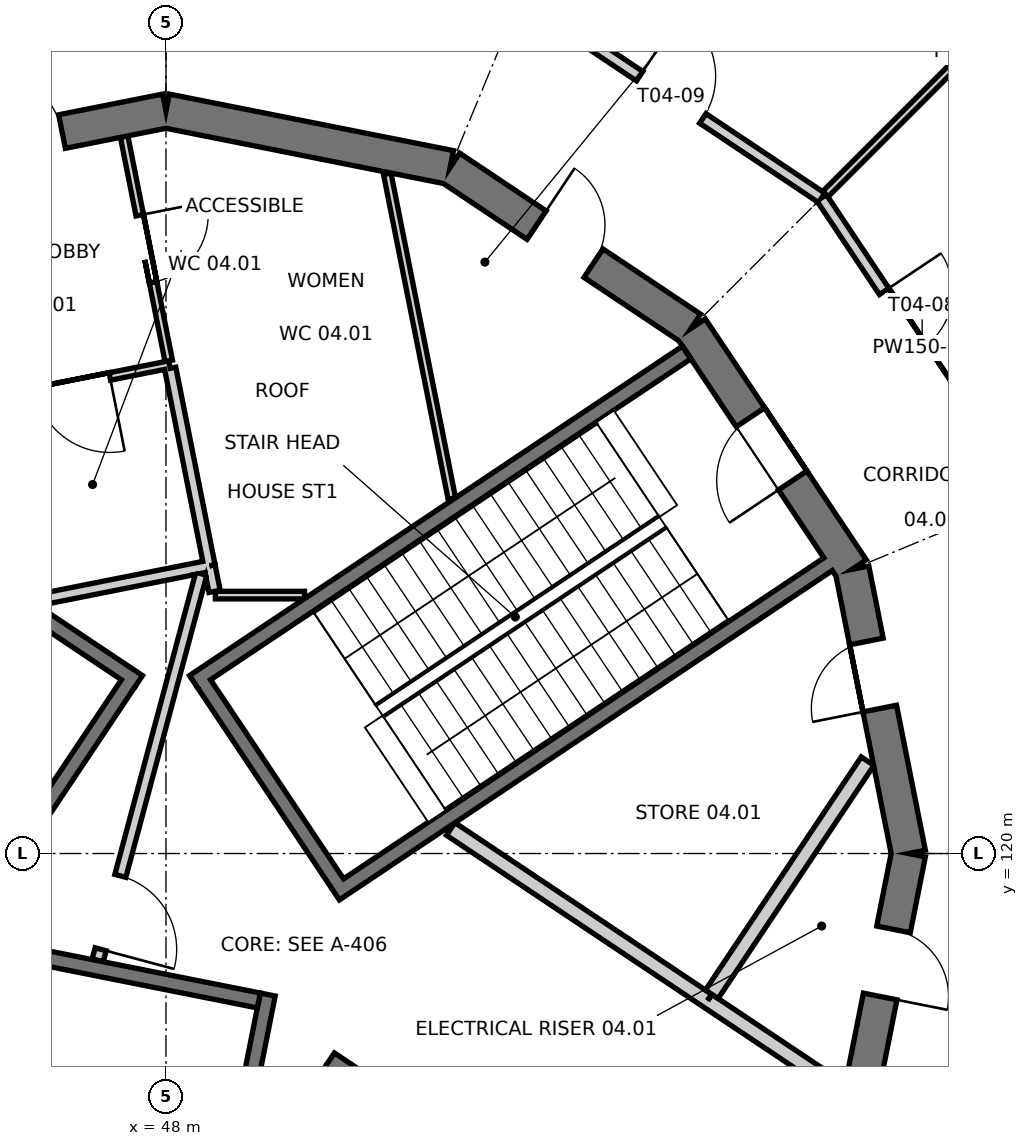
"""IFC4 building model, lengths in metres.
Left out: names, types, materials, properties, quantities, classifications, styles, units other than length and angle.
Written with IfcOpenShell. Run it as: python <this file> out.ifc"""

import sys

from ifc_helpers import new_model, si_unit, direction, frame, frame_2d, origin, place, context, subcontext, project, spatial, polyline, rectangle, outline, extrude, element, fill, save


model = new_model("IFC4")
c1 = context("Model", 3, precision=1e-05, world=origin(), true_north=direction((0.0, 1.0)))
c2 = subcontext(c1, "Body", "Model", "MODEL_VIEW")
j1 = project(units=[si_unit("LENGTHUNIT", "METRE"), si_unit("PLANEANGLEUNIT", "RADIAN")], contexts=[c1])
p1 = place(None, origin())
s1 = spatial("IfcSite", under=j1, at=p1, CompositionType="ELEMENT")
p2 = place(p1, origin())
s2 = spatial("IfcBuilding", under=s1, at=p2, CompositionType="ELEMENT")
p3 = place(p2, frame((0.0, 0.0, 20.4)))
s3 = spatial("IfcBuildingStorey", under=s2, at=p3, CompositionType="ELEMENT", Elevation=20.4)
p4 = place(p3, frame((57.771, 120.0, 0.0), z_axis=(0.0, 0.0, 1.0), x_axis=(-0.195069197673, 0.98078948206, 0.0)))
e1 = element("IfcWall", 1, at=p4, inside=s3, PredefinedType="SHEAR", context=c2, shape_type="SweptSolid", body=[
    extrude(outline(polyline([(-0.045, -0.225), (3.857, -0.225), (3.768, 0.225), (0.045, 0.225), (-0.045, -0.225)])), origin(), (0.0, 0.0, 1.0), 4.52),
])
p5 = place(p4, frame((1.945, 0.0, 0.0)))
e2 = element("IfcOpeningElement", 2, at=p5, cuts=e1, PredefinedType="OPENING", context=c2, shape_type="SweptSolid", body=[
    extrude(rectangle(XDim=0.9, YDim=2.1, at=frame_2d((0.45, 1.05))), frame((0.0, 0.235, 0.0), z_axis=(0.0, -1.0, 0.0), x_axis=(1.0, 0.0, 0.0)), (0.0, 0.0, 1.0), 0.47),
])
p6 = place(p3, frame((57.027, 123.739, 0.0), z_axis=(0.0, 0.0, 1.0), x_axis=(-0.555542277102, 0.83148829117, 0.0)))
e3 = element("IfcWall", 3, at=p6, inside=s3, PredefinedType="SHEAR", context=c2, shape_type="SweptSolid", body=[
    extrude(outline(polyline([(-0.045, -0.225), (3.857, -0.225), (3.768, 0.225), (0.045, 0.225), (-0.045, -0.225)])), origin(), (0.0, 0.0, 1.0), 4.52),
])
p7 = place(p6, frame((1.406, 0.0, 0.0)))
e4 = element("IfcOpeningElement", 4, at=p7, cuts=e3, PredefinedType="OPENING", context=c2, shape_type="SweptSolid", body=[
    extrude(rectangle(XDim=1.0, YDim=2.1, at=frame_2d((0.5, 1.05))), frame((0.0, 0.235, 0.0), z_axis=(0.0, -1.0, 0.0), x_axis=(1.0, 0.0, 0.0)), (0.0, 0.0, 1.0), 0.47),
])
p8 = place(p3, frame((54.909, 126.909, 0.0), z_axis=(0.0, 0.0, 1.0), x_axis=(-0.83148829117, 0.555542277102, 0.0)))
e5 = element("IfcWall", 5, at=p8, inside=s3, PredefinedType="SHEAR", context=c2, shape_type="SweptSolid", body=[
    extrude(outline(polyline([(-0.045, -0.225), (3.857, -0.225), (3.768, 0.225), (0.045, 0.225), (-0.045, -0.225)])), origin(), (0.0, 0.0, 1.0), 4.52),
])
p9 = place(p8, frame((1.545, 0.0, 0.0)))
e6 = element("IfcOpeningElement", 6, at=p9, cuts=e5, PredefinedType="OPENING", context=c2, shape_type="SweptSolid", body=[
    extrude(rectangle(XDim=0.9, YDim=2.1, at=frame_2d((0.45, 1.05))), frame((0.0, 0.235, 0.0), z_axis=(0.0, -1.0, 0.0), x_axis=(1.0, 0.0, 0.0)), (0.0, 0.0, 1.0), 0.47),
])
p10 = place(p3, frame((51.739, 129.027, 0.0), z_axis=(0.0, 0.0, 1.0), x_axis=(-0.98078948206, 0.195069197673, 0.0)))
e7 = element("IfcWall", 7, at=p10, inside=s3, PredefinedType="SHEAR", context=c2, shape_type="SweptSolid", body=[
    extrude(outline(polyline([(-0.045, -0.225), (3.857, -0.225), (3.768, 0.225), (0.045, 0.225), (-0.045, -0.225)])), origin(), (0.0, 0.0, 1.0), 4.52),
])
p11 = place(p3, frame((48.0, 129.771, 0.0), z_axis=(0.0, 0.0, 1.0), x_axis=(-0.98078948206, -0.195069197673, 0.0)))
e8 = element("IfcWall", 8, at=p11, inside=s3, PredefinedType="SHEAR", context=c2, shape_type="SweptSolid", body=[
    extrude(outline(polyline([(-0.045, -0.225), (3.857, -0.225), (3.768, 0.225), (0.045, 0.225), (-0.045, -0.225)])), origin(), (0.0, 0.0, 1.0), 4.52),
])
p12 = place(p11, frame((1.395, 0.0, 0.0)))
e9 = element("IfcOpeningElement", 9, at=p12, cuts=e8, PredefinedType="OPENING", context=c2, shape_type="SweptSolid", body=[
    extrude(rectangle(XDim=1.0, YDim=2.1, at=frame_2d((0.5, 1.05))), frame((0.0, 0.235, 0.0), z_axis=(0.0, -1.0, 0.0), x_axis=(1.0, 0.0, 0.0)), (0.0, 0.0, 1.0), 0.47),
])
p13 = place(p3, frame((57.027, 116.261, 0.0), z_axis=(0.0, 0.0, 1.0), x_axis=(0.195069197673, 0.98078948206, 0.0)))
e10 = element("IfcWall", 10, at=p13, inside=s3, PredefinedType="SHEAR", context=c2, shape_type="SweptSolid", body=[
    extrude(outline(polyline([(-0.045, -0.225), (3.857, -0.225), (3.768, 0.225), (0.045, 0.225), (-0.045, -0.225)])), origin(), (0.0, 0.0, 1.0), 4.52),
])
p14 = place(p13, frame((1.895, 0.0, 0.0)))
e11 = element("IfcOpeningElement", 11, at=p14, cuts=e10, PredefinedType="OPENING", context=c2, shape_type="SweptSolid", body=[
    extrude(rectangle(XDim=0.9, YDim=2.1, at=frame_2d((0.45, 1.05))), frame((0.0, 0.235, 0.0), z_axis=(0.0, -1.0, 0.0), x_axis=(1.0, 0.0, 0.0)), (0.0, 0.0, 1.0), 0.47),
])
p15 = place(p3, frame((48.365, 122.258, 0.0), z_axis=(0.0, 0.0, 1.0), x_axis=(0.831476803301, 0.555559470779, 0.0)))
e12 = element("IfcWall", 12, at=p15, inside=s3, PredefinedType="SHEAR", context=c2, shape_type="SweptSolid", body=[
    extrude(rectangle(XDim=7.8, YDim=0.2, at=frame_2d((3.9, 0.0))), origin(), (0.0, 0.0, 1.0), 4.52),
])
p16 = place(p3, frame((50.226, 119.473, 0.0), z_axis=(0.0, 0.0, 1.0), x_axis=(0.831486463828, 0.555545012102, 0.0)))
e13 = element("IfcWall", 13, at=p16, inside=s3, PredefinedType="SHEAR", context=c2, shape_type="SweptSolid", body=[
    extrude(rectangle(XDim=7.8, YDim=0.2, at=frame_2d((3.9, 0.0))), origin(), (0.0, 0.0, 1.0), 4.52),
])
p17 = place(p3, frame((50.253, 119.612, 0.0), z_axis=(0.0, 0.0, 1.0), x_axis=(-0.55555842186, 0.831477504146, 0.0)))
e14 = element("IfcWall", 14, at=p17, inside=s3, PredefinedType="SHEAR", context=c2, shape_type="SweptSolid", body=[
    extrude(rectangle(XDim=3.15, YDim=0.2, at=frame_2d((1.575, 0.0))), origin(), (0.0, 0.0, 1.0), 4.52),
])
p18 = place(p3, frame((47.635, 122.258, 0.0), z_axis=(0.0, 0.0, 1.0), x_axis=(-0.831476803301, 0.555559470779, 0.0)))
e15 = element("IfcWall", 15, at=p18, inside=s3, PredefinedType="SHEAR", context=c2, shape_type="SweptSolid", body=[
    extrude(rectangle(XDim=7.8, YDim=0.2, at=frame_2d((3.9, 0.0))), origin(), (0.0, 0.0, 1.0), 4.52),
])
p19 = place(p3, frame((47.497, 122.231, 0.0), z_axis=(0.0, 0.0, 1.0), x_axis=(-0.55555842186, -0.831477504146, 0.0)))
e16 = element("IfcWall", 16, at=p19, inside=s3, PredefinedType="SHEAR", context=c2, shape_type="SweptSolid", body=[
    extrude(rectangle(XDim=3.15, YDim=0.2, at=frame_2d((1.575, 0.0))), origin(), (0.0, 0.0, 1.0), 4.52),
])
p20 = place(p3, frame((49.339, 118.145, 0.0), z_axis=(0.0, 0.0, 1.0), x_axis=(-0.195092759861, -0.980784795483, 0.0)))
e17 = element("IfcWall", 17, at=p20, inside=s3, PredefinedType="SHEAR", context=c2, shape_type="SweptSolid", body=[
    extrude(rectangle(XDim=7.8, YDim=0.2, at=frame_2d((3.9, 0.0))), origin(), (0.0, 0.0, 1.0), 4.52),
])
p21 = place(p3, frame((46.132, 118.681, 0.0), z_axis=(0.0, 0.0, 1.0), x_axis=(0.980785830564, -0.195087556151, 0.0)))
e18 = element("IfcWall", 18, at=p21, inside=s3, PredefinedType="SHEAR", context=c2, shape_type="SweptSolid", body=[
    extrude(rectangle(XDim=3.15, YDim=0.2, at=frame_2d((1.575, 0.0))), origin(), (0.0, 0.0, 1.0), 4.52),
])
p22 = place(p3, frame((50.16, 117.293, 0.0), z_axis=(0.0, 0.0, 1.0), x_axis=(0.831479497601, -0.55555543834, 0.0)))
e19 = element("IfcWall", 19, at=p22, inside=s3, PredefinedType="SHEAR", context=c2, shape_type="SweptSolid", body=[
    extrude(rectangle(XDim=5.4, YDim=0.2, at=frame_2d((2.7, 0.0))), origin(), (0.0, 0.0, 1.0), 9.02),
])
p23 = place(p22, frame((0.85, 0.0, 0.0)))
e20 = element("IfcOpeningElement", 20, at=p23, cuts=e19, PredefinedType="OPENING", context=c2, shape_type="SweptSolid", body=[
    extrude(rectangle(XDim=1.1, YDim=2.1, at=frame_2d((0.55, 1.05))), frame((0.0, 0.11, 0.0), z_axis=(0.0, -1.0, 0.0), x_axis=(1.0, 0.0, 0.0)), (0.0, 0.0, 1.0), 0.22),
])
p24 = place(p22, frame((3.45, 0.0, 0.0)))
e21 = element("IfcOpeningElement", 21, at=p24, cuts=e19, PredefinedType="OPENING", context=c2, shape_type="SweptSolid", body=[
    extrude(rectangle(XDim=1.1, YDim=2.1, at=frame_2d((0.55, 1.05))), frame((0.0, 0.11, 0.0), z_axis=(0.0, -1.0, 0.0), x_axis=(1.0, 0.0, 0.0)), (0.0, 0.0, 1.0), 0.22),
])
p25 = place(p3, frame((50.188, 117.155, 0.0), z_axis=(0.0, 0.0, 1.0), x_axis=(-0.555559945722, -0.831476485963, 0.0)))
e22 = element("IfcWall", 22, at=p25, inside=s3, PredefinedType="SHEAR", context=c2, shape_type="SweptSolid", body=[
    extrude(rectangle(XDim=1.9, YDim=0.2, at=frame_2d((0.95, 0.0))), origin(), (0.0, 0.0, 1.0), 9.02),
])
p26 = place(p3, frame((48.365, 122.258, 4.8), z_axis=(0.0, 0.0, 1.0), x_axis=(0.831476803301, 0.555559470779, 0.0)))
e23 = element("IfcWall", 23, at=p26, inside=s3, PredefinedType="SOLIDWALL", context=c2, shape_type="SweptSolid", body=[
    extrude(rectangle(XDim=7.8, YDim=0.2, at=frame_2d((3.9, 0.0))), origin(), (0.0, 0.0, 1.0), 2.4),
])
p27 = place(p3, frame((50.226, 119.473, 4.8), z_axis=(0.0, 0.0, 1.0), x_axis=(0.831486463828, 0.555545012102, 0.0)))
e24 = element("IfcWall", 24, at=p27, inside=s3, PredefinedType="SOLIDWALL", context=c2, shape_type="SweptSolid", body=[
    extrude(rectangle(XDim=7.8, YDim=0.2, at=frame_2d((3.9, 0.0))), origin(), (0.0, 0.0, 1.0), 2.4),
])
p28 = place(p3, frame((50.253, 119.612, 4.8), z_axis=(0.0, 0.0, 1.0), x_axis=(-0.55555842186, 0.831477504146, 0.0)))
e25 = element("IfcWall", 25, at=p28, inside=s3, PredefinedType="SOLIDWALL", context=c2, shape_type="SweptSolid", body=[
    extrude(rectangle(XDim=3.15, YDim=0.2, at=frame_2d((1.575, 0.0))), origin(), (0.0, 0.0, 1.0), 2.4),
])
p29 = place(p3, frame((56.85, 123.779, 4.8), z_axis=(0.0, 0.0, 1.0), x_axis=(-0.555572709421, 0.831467957619, 0.0)))
e26 = element("IfcWall", 26, at=p29, inside=s3, PredefinedType="SOLIDWALL", context=c2, shape_type="SweptSolid", body=[
    extrude(rectangle(XDim=3.55, YDim=0.2, at=frame_2d((1.775, 0.0))), origin(), (0.0, 0.0, 1.0), 2.4),
])
p30 = place(p29, frame((1.275, 0.0, 0.16)))
e27 = element("IfcOpeningElement", 27, at=p30, cuts=e26, PredefinedType="OPENING", context=c2, shape_type="SweptSolid", body=[
    extrude(rectangle(XDim=1.0, YDim=2.1, at=frame_2d((0.5, 1.05))), frame((0.0, 0.11, 0.0), z_axis=(0.0, -1.0, 0.0), x_axis=(1.0, 0.0, 0.0)), (0.0, 0.0, 1.0), 0.22),
])
p31 = place(p3, frame((55.492, 123.112, 4.96), z_axis=(0.0, 0.0, 1.0), x_axis=(-0.555488691107, 0.831524091083, 0.0)))
e28 = element("IfcWall", 28, at=p31, inside=s3, PredefinedType="SOLIDWALL", context=c2, shape_type="SweptSolid", body=[
    extrude(rectangle(XDim=1.5, YDim=0.2, at=frame_2d((0.75, 0.0))), origin(), (0.0, 0.0, 1.0), 1.1),
])
p32 = place(p3, frame((47.635, 122.258, 4.8), z_axis=(0.0, 0.0, 1.0), x_axis=(-0.831476803301, 0.555559470779, 0.0)))
e29 = element("IfcWall", 29, at=p32, inside=s3, PredefinedType="SOLIDWALL", context=c2, shape_type="SweptSolid", body=[
    extrude(rectangle(XDim=7.8, YDim=0.2, at=frame_2d((3.9, 0.0))), origin(), (0.0, 0.0, 1.0), 2.4),
])
p33 = place(p3, frame((47.497, 122.231, 4.8), z_axis=(0.0, 0.0, 1.0), x_axis=(-0.55555842186, -0.831477504146, 0.0)))
e30 = element("IfcWall", 30, at=p33, inside=s3, PredefinedType="SOLIDWALL", context=c2, shape_type="SweptSolid", body=[
    extrude(rectangle(XDim=3.15, YDim=0.2, at=frame_2d((1.575, 0.0))), origin(), (0.0, 0.0, 1.0), 2.4),
])
p34 = place(p3, frame((55.126, 118.065, 0.0), z_axis=(0.0, 0.0, 1.0), x_axis=(-0.831495502265, 0.555531483998, 0.0)))
e31 = element("IfcWall", 31, at=p34, inside=s3, PredefinedType="SOLIDWALL", context=c2, shape_type="SweptSolid", body=[
    extrude(rectangle(XDim=4.065, YDim=0.2, at=frame_2d((2.033, 0.0))), origin(), (0.0, 0.0, 1.0), 4.52),
])
p35 = place(p3, frame((57.231, 121.215, 0.0), z_axis=(0.0, 0.0, 1.0), x_axis=(-0.555600969312, -0.831449074147, 0.0)))
e32 = element("IfcWall", 32, at=p35, inside=s3, PredefinedType="SOLIDWALL", context=c2, shape_type="SweptSolid", body=[
    extrude(rectangle(XDim=3.689, YDim=0.2, at=frame_2d((1.844, 0.0))), origin(), (0.0, 0.0, 1.0), 4.52),
])
p36 = place(p3, frame((56.885, 116.89, 0.0), z_axis=(0.0, 0.0, 1.0), x_axis=(-0.831446094913, 0.555605427667, 0.0)))
e33 = element("IfcWall", 33, at=p36, inside=s3, PredefinedType="SOLIDWALL", context=c2, shape_type="SweptSolid", body=[
    extrude(rectangle(XDim=2.115, YDim=0.2, at=frame_2d((1.058, 0.0))), origin(), (0.0, 0.0, 1.0), 4.52),
])
p37 = place(p3, frame((48.046, 126.433, 0.0), z_axis=(0.0, 0.0, 1.0), x_axis=(-0.980778805994, -0.195122868248, 0.0)))
e34 = element("IfcWall", 34, at=p37, inside=s3, PredefinedType="PARTITIONING", context=c2, shape_type="SweptSolid", body=[
    extrude(rectangle(XDim=2.6, YDim=0.1, at=frame_2d((1.3, 0.0))), origin(), (0.0, 0.0, 1.0), 4.52),
])
p38 = place(p37, frame((0.8, 0.0, 0.0)))
e35 = element("IfcOpeningElement", 35, at=p38, cuts=e34, PredefinedType="OPENING", context=c2, shape_type="SweptSolid", body=[
    extrude(rectangle(XDim=1.0, YDim=2.1, at=frame_2d((0.5, 1.05))), frame((0.0, 0.06, 0.0), z_axis=(0.0, -1.0, 0.0), x_axis=(1.0, 0.0, 0.0)), (0.0, 0.0, 1.0), 0.12),
])
p39 = place(p3, frame((47.449, 129.432, 0.0), z_axis=(0.0, 0.0, 1.0), x_axis=(0.195054549846, -0.980792395252, 0.0)))
e36 = element("IfcWall", 36, at=p39, inside=s3, PredefinedType="PARTITIONING", context=c2, shape_type="SweptSolid", body=[
    extrude(rectangle(XDim=3.008, YDim=0.1, at=frame_2d((1.504, 0.0))), origin(), (0.0, 0.0, 1.0), 4.52),
])
p40 = place(p39, frame((1.054, 0.0, 0.0)))
e37 = element("IfcOpeningElement", 37, at=p40, cuts=e36, PredefinedType="OPENING", context=c2, shape_type="SweptSolid", body=[
    extrude(rectangle(XDim=0.9, YDim=2.1, at=frame_2d((0.45, 1.05))), frame((0.0, 0.06, 0.0), z_axis=(0.0, -1.0, 0.0), x_axis=(1.0, 0.0, 0.0)), (0.0, 0.0, 1.0), 0.12),
])
p41 = place(p3, frame((48.056, 126.384, 0.0), z_axis=(0.0, 0.0, 1.0), x_axis=(0.195123903338, -0.980778600065, 0.0)))
e38 = element("IfcWall", 38, at=p41, inside=s3, PredefinedType="PARTITIONING", context=c2, shape_type="SweptSolid", body=[
    extrude(rectangle(XDim=2.65, YDim=0.15, at=frame_2d((1.325, 0.0))), origin(), (0.0, 0.0, 1.0), 4.52),
])
p42 = place(p3, frame((48.524, 123.775, 0.0), z_axis=(0.0, 0.0, 1.0), x_axis=(-0.980777249161, -0.195130693455, 0.0)))
e39 = element("IfcWall", 39, at=p42, inside=s3, PredefinedType="PARTITIONING", context=c2, shape_type="SweptSolid", body=[
    extrude(rectangle(XDim=2.287, YDim=0.15, at=frame_2d((1.144, 0.0))), origin(), (0.0, 0.0, 1.0), 4.52),
])
p43 = place(p3, frame((50.911, 128.943, 0.0), z_axis=(0.0, 0.0, 1.0), x_axis=(0.195113868301, -0.980780596462, 0.0)))
e40 = element("IfcWall", 40, at=p43, inside=s3, PredefinedType="PARTITIONING", context=c2, shape_type="SweptSolid", body=[
    extrude(rectangle(XDim=4.357, YDim=0.1, at=frame_2d((2.178, 0.0))), origin(), (0.0, 0.0, 1.0), 4.52),
])
p44 = place(p3, frame((49.823, 123.4, 0.0), z_axis=(0.0, 0.0, 1.0), x_axis=(-1.0, 0.0, 0.0)))
e41 = element("IfcWall", 41, at=p44, inside=s3, PredefinedType="PARTITIONING", context=c2, shape_type="SweptSolid", body=[
    extrude(rectangle(XDim=1.174, YDim=0.1, at=frame_2d((0.587, 0.0))), origin(), (0.0, 0.0, 1.0), 4.52),
])
p45 = place(p3, frame((48.639, 123.449, 0.0), z_axis=(0.0, 0.0, 1.0), x_axis=(-0.194880473507, 0.98082699853, 0.0)))
e42 = element("IfcWall", 42, at=p45, inside=s3, PredefinedType="PARTITIONING", context=c2, shape_type="SweptSolid", body=[
    extrude(rectangle(XDim=0.342, YDim=0.15, at=frame_2d((0.171, 0.0))), origin(), (0.0, 0.0, 1.0), 4.52),
])
p46 = place(p3, frame((47.102, 118.595, 0.0), z_axis=(0.0, 0.0, 1.0), x_axis=(0.258814124304, 0.9659271448, 0.0)))
e43 = element("IfcWall", 43, at=p46, inside=s3, PredefinedType="PARTITIONING", context=c2, shape_type="SweptSolid", body=[
    extrude(rectangle(XDim=5.265, YDim=0.15, at=frame_2d((2.632, 0.0))), origin(), (0.0, 0.0, 1.0), 4.52),
])
p47 = place(p46, frame((0.15, 0.0, 0.0)))
e44 = element("IfcOpeningElement", 44, at=p47, cuts=e43, PredefinedType="OPENING", context=c2, shape_type="SweptSolid", body=[
    extrude(rectangle(XDim=1.0, YDim=2.1, at=frame_2d((0.5, 1.05))), frame((0.0, 0.085, 0.0), z_axis=(0.0, -1.0, 0.0), x_axis=(1.0, 0.0, 0.0)), (0.0, 0.0, 1.0), 0.17),
])
p48 = place(p3, frame((56.627, 128.627, 0.0), z_axis=(0.0, 0.0, 1.0), x_axis=(0.555552075851, -0.831481744248, 0.0)))
e45 = element("IfcWall", 45, at=p48, inside=s3, PredefinedType="PARTITIONING", context=c2, shape_type="SweptSolid", body=[
    extrude(rectangle(XDim=4.76, YDim=0.15, at=frame_2d((2.38, 0.0))), origin(), (0.0, 0.0, 1.0), 4.52),
])
p49 = place(p48, frame((1.48, 0.0, 0.0)))
e46 = element("IfcOpeningElement", 46, at=p49, cuts=e45, PredefinedType="OPENING", context=c2, shape_type="SweptSolid", body=[
    extrude(rectangle(XDim=1.8, YDim=2.1, at=frame_2d((0.9, 1.05))), frame((0.0, 0.085, 0.0), z_axis=(0.0, -1.0, 0.0), x_axis=(1.0, 0.0, 0.0)), (0.0, 0.0, 1.0), 0.17),
])
p50 = place(p3, frame((52.669, 131.271, 0.0), z_axis=(0.0, 0.0, 1.0), x_axis=(0.831481744248, -0.555552075851, 0.0)))
e47 = element("IfcWall", 47, at=p50, inside=s3, PredefinedType="PARTITIONING", context=c2, shape_type="SweptSolid", body=[
    extrude(rectangle(XDim=4.76, YDim=0.15, at=frame_2d((2.38, 0.0))), origin(), (0.0, 0.0, 1.0), 4.52),
])
p51 = place(p50, frame((1.88, 0.0, 0.0)))
e48 = element("IfcOpeningElement", 48, at=p51, cuts=e47, PredefinedType="OPENING", context=c2, shape_type="SweptSolid", body=[
    extrude(rectangle(XDim=1.0, YDim=2.1, at=frame_2d((0.5, 1.05))), frame((0.0, 0.085, 0.0), z_axis=(0.0, -1.0, 0.0), x_axis=(1.0, 0.0, 0.0)), (0.0, 0.0, 1.0), 0.17),
])
p52 = place(p3, frame((56.677, 128.677, 0.0), z_axis=(0.0, 0.0, 1.0), x_axis=(0.707106781187, 0.707106781187, 0.0)))
e49 = element("IfcWall", 49, at=p52, inside=s3, PredefinedType="PARTITIONING", context=c2, shape_type="SweptSolid", body=[
    extrude(rectangle(XDim=5.289, YDim=0.1, at=frame_2d((2.644, 0.0))), origin(), (0.0, 0.0, 1.0), 3.72),
])
p53 = place(p30, origin())
e50 = element("IfcDoor", 50, at=p53, inside=s3, OperationType="SINGLE_SWING_LEFT", PredefinedType="DOOR", context=c2, shape_type="SweptSolid", body=[
    extrude(rectangle(XDim=1.0, YDim=2.1, at=frame_2d((0.5, 1.05))), frame((0.0, 0.025, 0.0), z_axis=(0.0, -1.0, 0.0), x_axis=(1.0, 0.0, 0.0)), (0.0, 0.0, 1.0), 0.05),
])
fill(e27, e50)
p54 = place(p7, origin())
e51 = element("IfcDoor", 51, at=p54, inside=s3, OperationType="SINGLE_SWING_LEFT", PredefinedType="DOOR", context=c2, shape_type="SweptSolid", body=[
    extrude(rectangle(XDim=1.0, YDim=2.1, at=frame_2d((0.5, 1.05))), frame((0.0, 0.025, 0.0), z_axis=(0.0, -1.0, 0.0), x_axis=(1.0, 0.0, 0.0)), (0.0, 0.0, 1.0), 0.05),
])
fill(e4, e51)
p55 = place(p5, origin())
e52 = element("IfcDoor", 52, at=p55, inside=s3, OperationType="SINGLE_SWING_LEFT", PredefinedType="DOOR", context=c2, shape_type="SweptSolid", body=[
    extrude(rectangle(XDim=0.9, YDim=2.1, at=frame_2d((0.45, 1.05))), frame((0.0, 0.025, 0.0), z_axis=(0.0, -1.0, 0.0), x_axis=(1.0, 0.0, 0.0)), (0.0, 0.0, 1.0), 0.05),
])
fill(e2, e52)
p56 = place(p14, frame((0.9, 0.0, 0.0), z_axis=(0.0, 0.0, 1.0), x_axis=(-1.0, 0.0, 0.0)))
e53 = element("IfcDoor", 53, at=p56, inside=s3, OperationType="SINGLE_SWING_RIGHT", PredefinedType="DOOR", context=c2, shape_type="SweptSolid", body=[
    extrude(rectangle(XDim=0.9, YDim=2.1, at=frame_2d((0.45, 1.05))), frame((0.0, 0.025, 0.0), z_axis=(0.0, -1.0, 0.0), x_axis=(1.0, 0.0, 0.0)), (0.0, 0.0, 1.0), 0.05),
])
fill(e11, e53)
p57 = place(p12, frame((1.0, 0.0, 0.0), z_axis=(0.0, 0.0, 1.0), x_axis=(-1.0, 0.0, 0.0)))
e54 = element("IfcDoor", 54, at=p57, inside=s3, OperationType="SINGLE_SWING_LEFT", PredefinedType="DOOR", context=c2, shape_type="SweptSolid", body=[
    extrude(rectangle(XDim=1.0, YDim=2.1, at=frame_2d((0.5, 1.05))), frame((0.0, 0.025, 0.0), z_axis=(0.0, -1.0, 0.0), x_axis=(1.0, 0.0, 0.0)), (0.0, 0.0, 1.0), 0.05),
])
fill(e9, e54)
p58 = place(p9, frame((0.9, 0.0, 0.0), z_axis=(0.0, 0.0, 1.0), x_axis=(-1.0, 0.0, 0.0)))
e55 = element("IfcDoor", 55, at=p58, inside=s3, OperationType="SINGLE_SWING_LEFT", PredefinedType="DOOR", context=c2, shape_type="SweptSolid", body=[
    extrude(rectangle(XDim=0.9, YDim=2.1, at=frame_2d((0.45, 1.05))), frame((0.0, 0.025, 0.0), z_axis=(0.0, -1.0, 0.0), x_axis=(1.0, 0.0, 0.0)), (0.0, 0.0, 1.0), 0.05),
])
fill(e6, e55)
p59 = place(p38, origin())
e56 = element("IfcDoor", 56, at=p59, inside=s3, OperationType="SINGLE_SWING_LEFT", PredefinedType="DOOR", context=c2, shape_type="SweptSolid", body=[
    extrude(rectangle(XDim=1.0, YDim=2.1, at=frame_2d((0.5, 1.05))), frame((0.0, 0.025, 0.0), z_axis=(0.0, -1.0, 0.0), x_axis=(1.0, 0.0, 0.0)), (0.0, 0.0, 1.0), 0.05),
])
fill(e35, e56)
p60 = place(p40, origin())
e57 = element("IfcDoor", 57, at=p60, inside=s3, OperationType="SINGLE_SWING_LEFT", PredefinedType="DOOR", context=c2, shape_type="SweptSolid", body=[
    extrude(rectangle(XDim=0.9, YDim=2.1, at=frame_2d((0.45, 1.05))), frame((0.0, 0.025, 0.0), z_axis=(0.0, -1.0, 0.0), x_axis=(1.0, 0.0, 0.0)), (0.0, 0.0, 1.0), 0.05),
])
fill(e37, e57)
p61 = place(p47, frame((1.0, 0.0, 0.0), z_axis=(0.0, 0.0, 1.0), x_axis=(-1.0, 0.0, 0.0)))
e58 = element("IfcDoor", 58, at=p61, inside=s3, OperationType="SINGLE_SWING_RIGHT", PredefinedType="DOOR", context=c2, shape_type="SweptSolid", body=[
    extrude(rectangle(XDim=1.0, YDim=2.1, at=frame_2d((0.5, 1.05))), frame((0.0, 0.025, 0.0), z_axis=(0.0, -1.0, 0.0), x_axis=(1.0, 0.0, 0.0)), (0.0, 0.0, 1.0), 0.05),
])
fill(e44, e58)
p62 = place(p49, origin())
e59 = element("IfcDoor", 59, at=p62, inside=s3, OperationType="DOUBLE_DOOR_SINGLE_SWING", PredefinedType="DOOR", context=c2, shape_type="SweptSolid", body=[
    extrude(rectangle(XDim=1.8, YDim=2.1, at=frame_2d((0.9, 1.05))), frame((0.0, 0.025, 0.0), z_axis=(0.0, -1.0, 0.0), x_axis=(1.0, 0.0, 0.0)), (0.0, 0.0, 1.0), 0.05),
])
fill(e46, e59)
p63 = place(p51, origin())
e60 = element("IfcDoor", 60, at=p63, inside=s3, OperationType="SINGLE_SWING_LEFT", PredefinedType="DOOR", context=c2, shape_type="SweptSolid", body=[
    extrude(rectangle(XDim=1.0, YDim=2.1, at=frame_2d((0.5, 1.05))), frame((0.0, 0.025, 0.0), z_axis=(0.0, -1.0, 0.0), x_axis=(1.0, 0.0, 0.0)), (0.0, 0.0, 1.0), 0.05),
])
fill(e48, e60)
save(model, sys.argv[1])
